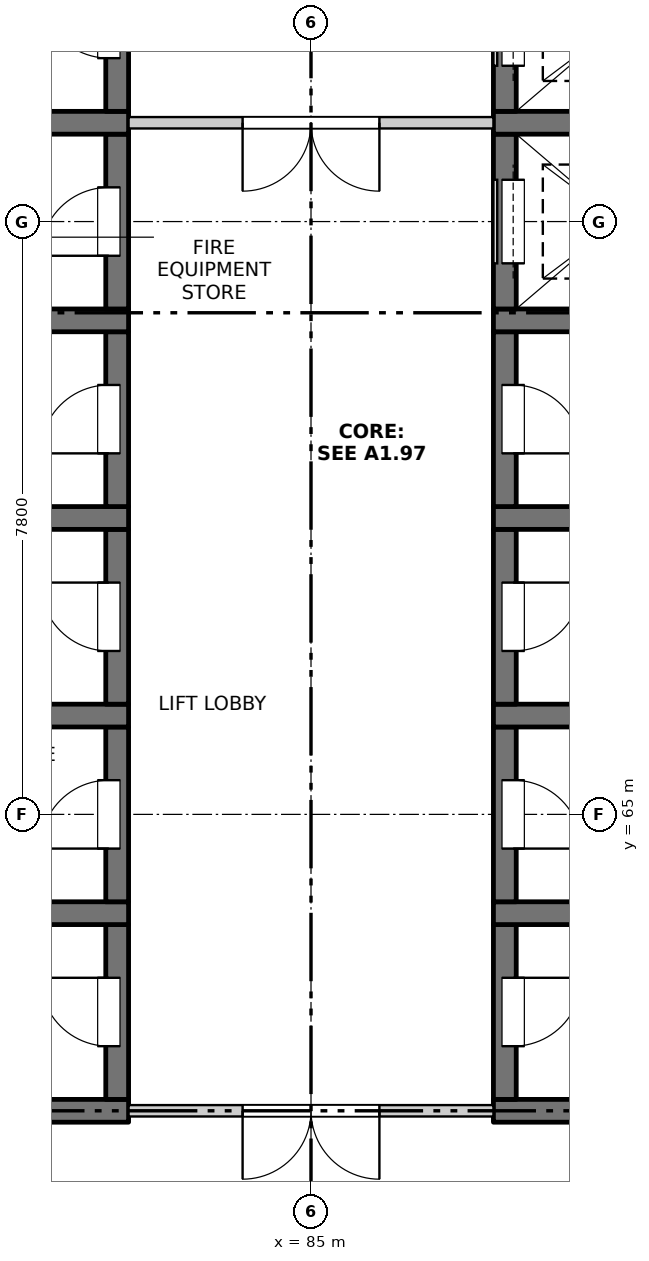
"""IFC4 building model, lengths in metres.
Left out: names, types, materials, properties, quantities, classifications, styles, units other than length and angle.
Written with IfcOpenShell. Run it as: python <this file> out.ifc"""

import sys

from ifc_helpers import new_model, si_unit, direction, frame, frame_2d, origin, place, context, subcontext, project, spatial, rectangle, extrude, element, fill, save


model = new_model("IFC4")
c1 = context("Model", 3, precision=1e-05, world=origin(), true_north=direction((0.0, 1.0)))
c2 = subcontext(c1, "Body", "Model", "MODEL_VIEW")
j1 = project(units=[si_unit("LENGTHUNIT", "METRE"), si_unit("PLANEANGLEUNIT", "RADIAN")], contexts=[c1])
p1 = place(None, origin())
s1 = spatial("IfcSite", under=j1, at=p1, CompositionType="ELEMENT")
p2 = place(p1, origin())
s2 = spatial("IfcBuilding", under=s1, at=p2, CompositionType="ELEMENT")
p3 = place(p2, frame((0.0, 0.0, 179.2)))
s3 = spatial("IfcBuildingStorey", under=s2, at=p3, CompositionType="ELEMENT", Elevation=179.2)
p4 = place(p3, frame((79.6, 61.1, -0.3), z_axis=(0.0, 0.0, 1.0), x_axis=(1.0, 0.0, 0.0)))
e1 = element("IfcWall", 1, at=p4, inside=s3, PredefinedType="SOLIDWALL", context=c2, shape_type="SweptSolid", body=[
    extrude(rectangle(XDim=3.0, YDim=0.3, at=frame_2d((1.5, 0.0))), origin(), (0.0, 0.0, 1.0), 3.45),
])
p5 = place(p3, frame((82.45, 61.25, -0.3), z_axis=(0.0, 0.0, 1.0), x_axis=(0.0, 1.0, 0.0)))
e2 = element("IfcWall", 2, at=p5, inside=s3, PredefinedType="SOLIDWALL", context=c2, shape_type="SweptSolid", body=[
    extrude(rectangle(XDim=2.3, YDim=0.3, at=frame_2d((1.15, 0.0))), origin(), (0.0, 0.0, 1.0), 3.45),
])
p6 = place(p5, frame((0.7, 0.0, 0.3)))
e3 = element("IfcOpeningElement", 3, at=p6, cuts=e2, PredefinedType="OPENING", context=c2, shape_type="SweptSolid", body=[
    extrude(rectangle(XDim=0.9, YDim=2.1, at=frame_2d((0.45, 1.05))), frame((0.0, 0.16, 0.0), z_axis=(0.0, -1.0, 0.0), x_axis=(1.0, 0.0, 0.0)), (0.0, 0.0, 1.0), 0.32),
])
p7 = place(p3, frame((79.6, 63.7, -0.3), z_axis=(0.0, 0.0, 1.0), x_axis=(1.0, 0.0, 0.0)))
e4 = element("IfcWall", 4, at=p7, inside=s3, PredefinedType="SOLIDWALL", context=c2, shape_type="SweptSolid", body=[
    extrude(rectangle(XDim=3.0, YDim=0.3, at=frame_2d((1.5, 0.0))), origin(), (0.0, 0.0, 1.0), 3.45),
])
p8 = place(p3, frame((82.45, 63.85, -0.3), z_axis=(0.0, 0.0, 1.0), x_axis=(0.0, 1.0, 0.0)))
e5 = element("IfcWall", 5, at=p8, inside=s3, PredefinedType="SOLIDWALL", context=c2, shape_type="SweptSolid", body=[
    extrude(rectangle(XDim=2.3, YDim=0.3, at=frame_2d((1.15, 0.0))), origin(), (0.0, 0.0, 1.0), 3.45),
])
p9 = place(p8, frame((0.7, 0.0, 0.3)))
e6 = element("IfcOpeningElement", 6, at=p9, cuts=e5, PredefinedType="OPENING", context=c2, shape_type="SweptSolid", body=[
    extrude(rectangle(XDim=0.9, YDim=2.1, at=frame_2d((0.45, 1.05))), frame((0.0, 0.16, 0.0), z_axis=(0.0, -1.0, 0.0), x_axis=(1.0, 0.0, 0.0)), (0.0, 0.0, 1.0), 0.32),
])
p10 = place(p3, frame((79.6, 66.3, -0.3), z_axis=(0.0, 0.0, 1.0), x_axis=(1.0, 0.0, 0.0)))
e7 = element("IfcWall", 7, at=p10, inside=s3, PredefinedType="SOLIDWALL", context=c2, shape_type="SweptSolid", body=[
    extrude(rectangle(XDim=3.0, YDim=0.3, at=frame_2d((1.5, 0.0))), origin(), (0.0, 0.0, 1.0), 3.45),
])
p11 = place(p3, frame((82.45, 66.45, -0.3), z_axis=(0.0, 0.0, 1.0), x_axis=(0.0, 1.0, 0.0)))
e8 = element("IfcWall", 8, at=p11, inside=s3, PredefinedType="SOLIDWALL", context=c2, shape_type="SweptSolid", body=[
    extrude(rectangle(XDim=2.3, YDim=0.3, at=frame_2d((1.15, 0.0))), origin(), (0.0, 0.0, 1.0), 3.45),
])
p12 = place(p11, frame((0.7, 0.0, 0.3)))
e9 = element("IfcOpeningElement", 9, at=p12, cuts=e8, PredefinedType="OPENING", context=c2, shape_type="SweptSolid", body=[
    extrude(rectangle(XDim=0.9, YDim=2.1, at=frame_2d((0.45, 1.05))), frame((0.0, 0.16, 0.0), z_axis=(0.0, -1.0, 0.0), x_axis=(1.0, 0.0, 0.0)), (0.0, 0.0, 1.0), 0.32),
])
p13 = place(p3, frame((79.6, 68.9, -0.3), z_axis=(0.0, 0.0, 1.0), x_axis=(1.0, 0.0, 0.0)))
e10 = element("IfcWall", 10, at=p13, inside=s3, PredefinedType="SOLIDWALL", context=c2, shape_type="SweptSolid", body=[
    extrude(rectangle(XDim=3.0, YDim=0.3, at=frame_2d((1.5, 0.0))), origin(), (0.0, 0.0, 1.0), 3.45),
])
p14 = place(p3, frame((82.45, 69.05, -0.3), z_axis=(0.0, 0.0, 1.0), x_axis=(0.0, 1.0, 0.0)))
e11 = element("IfcWall", 11, at=p14, inside=s3, PredefinedType="SOLIDWALL", context=c2, shape_type="SweptSolid", body=[
    extrude(rectangle(XDim=2.3, YDim=0.3, at=frame_2d((1.15, 0.0))), origin(), (0.0, 0.0, 1.0), 3.45),
])
p15 = place(p14, frame((0.7, 0.0, 0.3)))
e12 = element("IfcOpeningElement", 12, at=p15, cuts=e11, PredefinedType="OPENING", context=c2, shape_type="SweptSolid", body=[
    extrude(rectangle(XDim=0.9, YDim=2.1, at=frame_2d((0.45, 1.05))), frame((0.0, 0.16, 0.0), z_axis=(0.0, -1.0, 0.0), x_axis=(1.0, 0.0, 0.0)), (0.0, 0.0, 1.0), 0.32),
])
p16 = place(p3, frame((79.6, 71.5, -0.3), z_axis=(0.0, 0.0, 1.0), x_axis=(1.0, 0.0, 0.0)))
e13 = element("IfcWall", 13, at=p16, inside=s3, PredefinedType="SOLIDWALL", context=c2, shape_type="SweptSolid", body=[
    extrude(rectangle(XDim=3.0, YDim=0.3, at=frame_2d((1.5, 0.0))), origin(), (0.0, 0.0, 1.0), 3.45),
])
p17 = place(p3, frame((82.45, 71.65, -0.3), z_axis=(0.0, 0.0, 1.0), x_axis=(0.0, 1.0, 0.0)))
e14 = element("IfcWall", 14, at=p17, inside=s3, PredefinedType="SOLIDWALL", context=c2, shape_type="SweptSolid", body=[
    extrude(rectangle(XDim=2.3, YDim=0.3, at=frame_2d((1.15, 0.0))), origin(), (0.0, 0.0, 1.0), 3.45),
])
p18 = place(p17, frame((0.7, 0.0, 0.3)))
e15 = element("IfcOpeningElement", 15, at=p18, cuts=e14, PredefinedType="OPENING", context=c2, shape_type="SweptSolid", body=[
    extrude(rectangle(XDim=0.9, YDim=2.1, at=frame_2d((0.45, 1.05))), frame((0.0, 0.16, 0.0), z_axis=(0.0, -1.0, 0.0), x_axis=(1.0, 0.0, 0.0)), (0.0, 0.0, 1.0), 0.32),
])
p19 = place(p3, frame((79.6, 74.1, -0.3), z_axis=(0.0, 0.0, 1.0), x_axis=(1.0, 0.0, 0.0)))
e16 = element("IfcWall", 16, at=p19, inside=s3, PredefinedType="SOLIDWALL", context=c2, shape_type="SweptSolid", body=[
    extrude(rectangle(XDim=3.0, YDim=0.3, at=frame_2d((1.5, 0.0))), origin(), (0.0, 0.0, 1.0), 3.45),
])
p20 = place(p3, frame((82.45, 74.25, -0.3), z_axis=(0.0, 0.0, 1.0), x_axis=(0.0, 1.0, 0.0)))
e17 = element("IfcWall", 17, at=p20, inside=s3, PredefinedType="SOLIDWALL", context=c2, shape_type="SweptSolid", body=[
    extrude(rectangle(XDim=2.3, YDim=0.3, at=frame_2d((1.15, 0.0))), origin(), (0.0, 0.0, 1.0), 3.45),
])
p21 = place(p20, frame((0.7, 0.0, 0.3)))
e18 = element("IfcOpeningElement", 18, at=p21, cuts=e17, PredefinedType="OPENING", context=c2, shape_type="SweptSolid", body=[
    extrude(rectangle(XDim=0.9, YDim=2.1, at=frame_2d((0.45, 1.05))), frame((0.0, 0.16, 0.0), z_axis=(0.0, -1.0, 0.0), x_axis=(1.0, 0.0, 0.0)), (0.0, 0.0, 1.0), 0.32),
])
p22 = place(p3, frame((87.4, 61.1, -0.3), z_axis=(0.0, 0.0, 1.0), x_axis=(1.0, 0.0, 0.0)))
e19 = element("IfcWall", 19, at=p22, inside=s3, PredefinedType="SOLIDWALL", context=c2, shape_type="SweptSolid", body=[
    extrude(rectangle(XDim=3.0, YDim=0.3, at=frame_2d((1.5, 0.0))), origin(), (0.0, 0.0, 1.0), 3.45),
])
p23 = place(p3, frame((87.55, 61.25, -0.3), z_axis=(0.0, 0.0, 1.0), x_axis=(0.0, 1.0, 0.0)))
e20 = element("IfcWall", 20, at=p23, inside=s3, PredefinedType="SOLIDWALL", context=c2, shape_type="SweptSolid", body=[
    extrude(rectangle(XDim=2.3, YDim=0.3, at=frame_2d((1.15, 0.0))), origin(), (0.0, 0.0, 1.0), 3.45),
])
p24 = place(p23, frame((0.7, 0.0, 0.3)))
e21 = element("IfcOpeningElement", 21, at=p24, cuts=e20, PredefinedType="OPENING", context=c2, shape_type="SweptSolid", body=[
    extrude(rectangle(XDim=0.9, YDim=2.1, at=frame_2d((0.45, 1.05))), frame((0.0, 0.16, 0.0), z_axis=(0.0, -1.0, 0.0), x_axis=(1.0, 0.0, 0.0)), (0.0, 0.0, 1.0), 0.32),
])
p25 = place(p3, frame((87.4, 63.7, -0.3), z_axis=(0.0, 0.0, 1.0), x_axis=(1.0, 0.0, 0.0)))
e22 = element("IfcWall", 22, at=p25, inside=s3, PredefinedType="SOLIDWALL", context=c2, shape_type="SweptSolid", body=[
    extrude(rectangle(XDim=3.0, YDim=0.3, at=frame_2d((1.5, 0.0))), origin(), (0.0, 0.0, 1.0), 3.45),
])
p26 = place(p3, frame((87.55, 63.85, -0.3), z_axis=(0.0, 0.0, 1.0), x_axis=(0.0, 1.0, 0.0)))
e23 = element("IfcWall", 23, at=p26, inside=s3, PredefinedType="SOLIDWALL", context=c2, shape_type="SweptSolid", body=[
    extrude(rectangle(XDim=2.3, YDim=0.3, at=frame_2d((1.15, 0.0))), origin(), (0.0, 0.0, 1.0), 3.45),
])
p27 = place(p26, frame((0.7, 0.0, 0.3)))
e24 = element("IfcOpeningElement", 24, at=p27, cuts=e23, PredefinedType="OPENING", context=c2, shape_type="SweptSolid", body=[
    extrude(rectangle(XDim=0.9, YDim=2.1, at=frame_2d((0.45, 1.05))), frame((0.0, 0.16, 0.0), z_axis=(0.0, -1.0, 0.0), x_axis=(1.0, 0.0, 0.0)), (0.0, 0.0, 1.0), 0.32),
])
p28 = place(p3, frame((87.4, 66.3, -0.3), z_axis=(0.0, 0.0, 1.0), x_axis=(1.0, 0.0, 0.0)))
e25 = element("IfcWall", 25, at=p28, inside=s3, PredefinedType="SOLIDWALL", context=c2, shape_type="SweptSolid", body=[
    extrude(rectangle(XDim=3.0, YDim=0.3, at=frame_2d((1.5, 0.0))), origin(), (0.0, 0.0, 1.0), 3.45),
])
p29 = place(p3, frame((87.55, 66.45, -0.3), z_axis=(0.0, 0.0, 1.0), x_axis=(0.0, 1.0, 0.0)))
e26 = element("IfcWall", 26, at=p29, inside=s3, PredefinedType="SOLIDWALL", context=c2, shape_type="SweptSolid", body=[
    extrude(rectangle(XDim=2.3, YDim=0.3, at=frame_2d((1.15, 0.0))), origin(), (0.0, 0.0, 1.0), 3.45),
])
p30 = place(p29, frame((0.7, 0.0, 0.3)))
e27 = element("IfcOpeningElement", 27, at=p30, cuts=e26, PredefinedType="OPENING", context=c2, shape_type="SweptSolid", body=[
    extrude(rectangle(XDim=0.9, YDim=2.1, at=frame_2d((0.45, 1.05))), frame((0.0, 0.16, 0.0), z_axis=(0.0, -1.0, 0.0), x_axis=(1.0, 0.0, 0.0)), (0.0, 0.0, 1.0), 0.32),
])
p31 = place(p3, frame((87.4, 68.9, -0.3), z_axis=(0.0, 0.0, 1.0), x_axis=(1.0, 0.0, 0.0)))
e28 = element("IfcWall", 28, at=p31, inside=s3, PredefinedType="SOLIDWALL", context=c2, shape_type="SweptSolid", body=[
    extrude(rectangle(XDim=3.0, YDim=0.3, at=frame_2d((1.5, 0.0))), origin(), (0.0, 0.0, 1.0), 3.45),
])
p32 = place(p3, frame((87.55, 69.05, -0.3), z_axis=(0.0, 0.0, 1.0), x_axis=(0.0, 1.0, 0.0)))
e29 = element("IfcWall", 29, at=p32, inside=s3, PredefinedType="SOLIDWALL", context=c2, shape_type="SweptSolid", body=[
    extrude(rectangle(XDim=2.3, YDim=0.3, at=frame_2d((1.15, 0.0))), origin(), (0.0, 0.0, 1.0), 3.45),
])
p33 = place(p32, frame((0.7, 0.0, 0.3)))
e30 = element("IfcOpeningElement", 30, at=p33, cuts=e29, PredefinedType="OPENING", context=c2, shape_type="SweptSolid", body=[
    extrude(rectangle(XDim=0.9, YDim=2.1, at=frame_2d((0.45, 1.05))), frame((0.0, 0.16, 0.0), z_axis=(0.0, -1.0, 0.0), x_axis=(1.0, 0.0, 0.0)), (0.0, 0.0, 1.0), 0.32),
])
p34 = place(p3, frame((87.4, 71.5, -0.3), z_axis=(0.0, 0.0, 1.0), x_axis=(1.0, 0.0, 0.0)))
e31 = element("IfcWall", 31, at=p34, inside=s3, PredefinedType="SOLIDWALL", context=c2, shape_type="SweptSolid", body=[
    extrude(rectangle(XDim=3.0, YDim=0.3, at=frame_2d((1.5, 0.0))), origin(), (0.0, 0.0, 1.0), 3.45),
])
p35 = place(p3, frame((87.55, 71.65, -0.3), z_axis=(0.0, 0.0, 1.0), x_axis=(0.0, 1.0, 0.0)))
e32 = element("IfcWall", 32, at=p35, inside=s3, PredefinedType="SOLIDWALL", context=c2, shape_type="SweptSolid", body=[
    extrude(rectangle(XDim=2.3, YDim=0.3, at=frame_2d((1.15, 0.0))), origin(), (0.0, 0.0, 1.0), 3.45),
])
p36 = place(p35, frame((0.6, 0.0, 0.3)))
e33 = element("IfcOpeningElement", 33, at=p36, cuts=e32, PredefinedType="OPENING", context=c2, shape_type="SweptSolid", body=[
    extrude(rectangle(XDim=1.1, YDim=2.1, at=frame_2d((0.55, 1.05))), frame((0.0, 0.16, 0.0), z_axis=(0.0, -1.0, 0.0), x_axis=(1.0, 0.0, 0.0)), (0.0, 0.0, 1.0), 0.32),
])
p37 = place(p3, frame((87.4, 74.1, -0.3), z_axis=(0.0, 0.0, 1.0), x_axis=(1.0, 0.0, 0.0)))
e34 = element("IfcWall", 34, at=p37, inside=s3, PredefinedType="SOLIDWALL", context=c2, shape_type="SweptSolid", body=[
    extrude(rectangle(XDim=3.0, YDim=0.3, at=frame_2d((1.5, 0.0))), origin(), (0.0, 0.0, 1.0), 3.45),
])
p38 = place(p3, frame((87.55, 74.25, -0.3), z_axis=(0.0, 0.0, 1.0), x_axis=(0.0, 1.0, 0.0)))
e35 = element("IfcWall", 35, at=p38, inside=s3, PredefinedType="SOLIDWALL", context=c2, shape_type="SweptSolid", body=[
    extrude(rectangle(XDim=2.3, YDim=0.3, at=frame_2d((1.15, 0.0))), origin(), (0.0, 0.0, 1.0), 3.45),
])
p39 = place(p38, frame((0.6, 0.0, 0.3)))
e36 = element("IfcOpeningElement", 36, at=p39, cuts=e35, PredefinedType="OPENING", context=c2, shape_type="SweptSolid", body=[
    extrude(rectangle(XDim=1.1, YDim=2.1, at=frame_2d((0.55, 1.05))), frame((0.0, 0.16, 0.0), z_axis=(0.0, -1.0, 0.0), x_axis=(1.0, 0.0, 0.0)), (0.0, 0.0, 1.0), 0.32),
])
p40 = place(p3, frame((82.6, 61.1, 0.0), z_axis=(0.0, 0.0, 1.0), x_axis=(1.0, 0.0, 0.0)))
e37 = element("IfcWall", 37, at=p40, inside=s3, PredefinedType="PARTITIONING", context=c2, shape_type="SweptSolid", body=[
    extrude(rectangle(XDim=4.8, YDim=0.15, at=frame_2d((2.4, 0.0))), origin(), (0.0, 0.0, 1.0), 3.15),
])
p41 = place(p40, frame((1.5, 0.0, 0.0)))
e38 = element("IfcOpeningElement", 38, at=p41, cuts=e37, PredefinedType="OPENING", context=c2, shape_type="SweptSolid", body=[
    extrude(rectangle(XDim=1.8, YDim=2.1, at=frame_2d((0.9, 1.05))), frame((0.0, 0.085, 0.0), z_axis=(0.0, -1.0, 0.0), x_axis=(1.0, 0.0, 0.0)), (0.0, 0.0, 1.0), 0.17),
])
p42 = place(p3, frame((82.6, 74.1, 0.0), z_axis=(0.0, 0.0, 1.0), x_axis=(1.0, 0.0, 0.0)))
e39 = element("IfcWall", 39, at=p42, inside=s3, PredefinedType="PARTITIONING", context=c2, shape_type="SweptSolid", body=[
    extrude(rectangle(XDim=4.8, YDim=0.15, at=frame_2d((2.4, 0.0))), origin(), (0.0, 0.0, 1.0), 3.15),
])
p43 = place(p42, frame((1.5, 0.0, 0.0)))
e40 = element("IfcOpeningElement", 40, at=p43, cuts=e39, PredefinedType="OPENING", context=c2, shape_type="SweptSolid", body=[
    extrude(rectangle(XDim=1.8, YDim=2.1, at=frame_2d((0.9, 1.05))), frame((0.0, 0.085, 0.0), z_axis=(0.0, -1.0, 0.0), x_axis=(1.0, 0.0, 0.0)), (0.0, 0.0, 1.0), 0.17),
])
p44 = place(p41, origin())
e41 = element("IfcDoor", 41, at=p44, inside=s3, OperationType="DOUBLE_DOOR_SINGLE_SWING", PredefinedType="DOOR", context=c2, shape_type="SweptSolid", body=[
    extrude(rectangle(XDim=1.8, YDim=2.1, at=frame_2d((0.9, 1.05))), frame((0.0, 0.025, 0.0), z_axis=(0.0, -1.0, 0.0), x_axis=(1.0, 0.0, 0.0)), (0.0, 0.0, 1.0), 0.05),
])
fill(e38, e41)
p45 = place(p6, origin())
e42 = element("IfcDoor", 42, at=p45, inside=s3, OperationType="SINGLE_SWING_RIGHT", PredefinedType="DOOR", context=c2, shape_type="SweptSolid", body=[
    extrude(rectangle(XDim=0.9, YDim=2.1, at=frame_2d((0.45, 1.05))), frame((0.0, 0.135, 0.0), z_axis=(0.0, -1.0, 0.0), x_axis=(1.0, 0.0, 0.0)), (0.0, 0.0, 1.0), 0.05),
])
fill(e3, e42)
p46 = place(p24, origin())
e43 = element("IfcDoor", 43, at=p46, inside=s3, OperationType="SINGLE_SWING_LEFT", PredefinedType="DOOR", context=c2, shape_type="SweptSolid", body=[
    extrude(rectangle(XDim=0.9, YDim=2.1, at=frame_2d((0.45, 1.05))), frame((0.0, -0.085, 0.0), z_axis=(0.0, -1.0, 0.0), x_axis=(1.0, 0.0, 0.0)), (0.0, 0.0, 1.0), 0.05),
])
fill(e21, e43)
p47 = place(p9, origin())
e44 = element("IfcDoor", 44, at=p47, inside=s3, OperationType="SINGLE_SWING_LEFT", PredefinedType="DOOR", context=c2, shape_type="SweptSolid", body=[
    extrude(rectangle(XDim=0.9, YDim=2.1, at=frame_2d((0.45, 1.05))), frame((0.0, 0.135, 0.0), z_axis=(0.0, -1.0, 0.0), x_axis=(1.0, 0.0, 0.0)), (0.0, 0.0, 1.0), 0.05),
])
fill(e6, e44)
p48 = place(p27, origin())
e45 = element("IfcDoor", 45, at=p48, inside=s3, OperationType="SINGLE_SWING_RIGHT", PredefinedType="DOOR", context=c2, shape_type="SweptSolid", body=[
    extrude(rectangle(XDim=0.9, YDim=2.1, at=frame_2d((0.45, 1.05))), frame((0.0, -0.085, 0.0), z_axis=(0.0, -1.0, 0.0), x_axis=(1.0, 0.0, 0.0)), (0.0, 0.0, 1.0), 0.05),
])
fill(e24, e45)
p49 = place(p12, origin())
e46 = element("IfcDoor", 46, at=p49, inside=s3, OperationType="SINGLE_SWING_RIGHT", PredefinedType="DOOR", context=c2, shape_type="SweptSolid", body=[
    extrude(rectangle(XDim=0.9, YDim=2.1, at=frame_2d((0.45, 1.05))), frame((0.0, 0.135, 0.0), z_axis=(0.0, -1.0, 0.0), x_axis=(1.0, 0.0, 0.0)), (0.0, 0.0, 1.0), 0.05),
])
fill(e9, e46)
p50 = place(p30, origin())
e47 = element("IfcDoor", 47, at=p50, inside=s3, OperationType="SINGLE_SWING_LEFT", PredefinedType="DOOR", context=c2, shape_type="SweptSolid", body=[
    extrude(rectangle(XDim=0.9, YDim=2.1, at=frame_2d((0.45, 1.05))), frame((0.0, -0.085, 0.0), z_axis=(0.0, -1.0, 0.0), x_axis=(1.0, 0.0, 0.0)), (0.0, 0.0, 1.0), 0.05),
])
fill(e27, e47)
p51 = place(p15, origin())
e48 = element("IfcDoor", 48, at=p51, inside=s3, OperationType="SINGLE_SWING_LEFT", PredefinedType="DOOR", context=c2, shape_type="SweptSolid", body=[
    extrude(rectangle(XDim=0.9, YDim=2.1, at=frame_2d((0.45, 1.05))), frame((0.0, 0.135, 0.0), z_axis=(0.0, -1.0, 0.0), x_axis=(1.0, 0.0, 0.0)), (0.0, 0.0, 1.0), 0.05),
])
fill(e12, e48)
p52 = place(p33, origin())
e49 = element("IfcDoor", 49, at=p52, inside=s3, OperationType="SINGLE_SWING_RIGHT", PredefinedType="DOOR", context=c2, shape_type="SweptSolid", body=[
    extrude(rectangle(XDim=0.9, YDim=2.1, at=frame_2d((0.45, 1.05))), frame((0.0, -0.085, 0.0), z_axis=(0.0, -1.0, 0.0), x_axis=(1.0, 0.0, 0.0)), (0.0, 0.0, 1.0), 0.05),
])
fill(e30, e49)
p53 = place(p18, origin())
e50 = element("IfcDoor", 50, at=p53, inside=s3, OperationType="SINGLE_SWING_LEFT", PredefinedType="DOOR", context=c2, shape_type="SweptSolid", body=[
    extrude(rectangle(XDim=0.9, YDim=2.1, at=frame_2d((0.45, 1.05))), frame((0.0, 0.135, 0.0), z_axis=(0.0, -1.0, 0.0), x_axis=(1.0, 0.0, 0.0)), (0.0, 0.0, 1.0), 0.05),
])
fill(e15, e50)
p54 = place(p36, origin())
e51 = element("IfcDoor", 51, at=p54, inside=s3, OperationType="SLIDING_TO_LEFT", PredefinedType="DOOR", context=c2, shape_type="SweptSolid", body=[
    extrude(rectangle(XDim=1.1, YDim=2.1, at=frame_2d((0.55, 1.05))), frame((0.0, -0.085, 0.0), z_axis=(0.0, -1.0, 0.0), x_axis=(1.0, 0.0, 0.0)), (0.0, 0.0, 1.0), 0.05),
])
fill(e33, e51)
p55 = place(p43, origin())
e52 = element("IfcDoor", 52, at=p55, inside=s3, OperationType="DOUBLE_DOOR_SINGLE_SWING", PredefinedType="DOOR", context=c2, shape_type="SweptSolid", body=[
    extrude(rectangle(XDim=1.8, YDim=2.1, at=frame_2d((0.9, 1.05))), frame((0.0, 0.025, 0.0), z_axis=(0.0, -1.0, 0.0), x_axis=(1.0, 0.0, 0.0)), (0.0, 0.0, 1.0), 0.05),
])
fill(e40, e52)
p56 = place(p21, origin())
e53 = element("IfcDoor", 53, at=p56, inside=s3, OperationType="SINGLE_SWING_RIGHT", PredefinedType="DOOR", context=c2, shape_type="SweptSolid", body=[
    extrude(rectangle(XDim=0.9, YDim=2.1, at=frame_2d((0.45, 1.05))), frame((0.0, 0.135, 0.0), z_axis=(0.0, -1.0, 0.0), x_axis=(1.0, 0.0, 0.0)), (0.0, 0.0, 1.0), 0.05),
])
fill(e18, e53)
p57 = place(p39, origin())
e54 = element("IfcDoor", 54, at=p57, inside=s3, OperationType="SLIDING_TO_LEFT", PredefinedType="DOOR", context=c2, shape_type="SweptSolid", body=[
    extrude(rectangle(XDim=1.1, YDim=2.1, at=frame_2d((0.55, 1.05))), frame((0.0, -0.085, 0.0), z_axis=(0.0, -1.0, 0.0), x_axis=(1.0, 0.0, 0.0)), (0.0, 0.0, 1.0), 0.05),
])
fill(e36, e54)
save(model, sys.argv[1])
